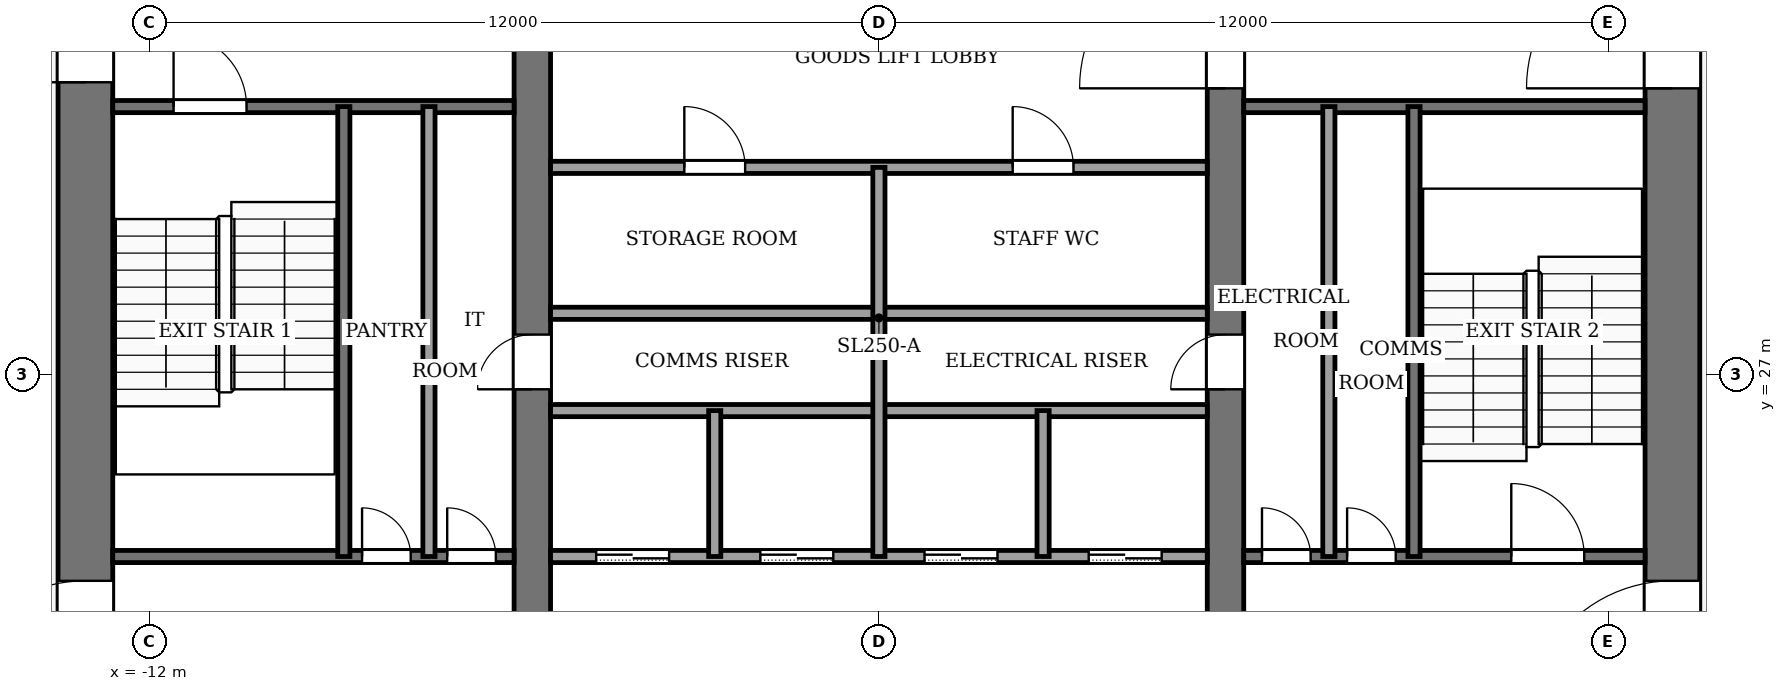
"""IFC4 building model, lengths in metres.
Left out: names, types, materials, properties, quantities, classifications, styles, units other than length and angle.
Written with IfcOpenShell. Run it as: python <this file> out.ifc"""

import sys

from ifc_helpers import new_model, si_unit, direction, frame, frame_2d, origin, place, context, subcontext, project, spatial, rectangle, extrude, element, fill, save


model = new_model("IFC4")
c1 = context("Model", 3, precision=1e-05, world=origin(), true_north=direction((0.0, 1.0)))
c2 = subcontext(c1, "Body", "Model", "MODEL_VIEW")
j1 = project(units=[si_unit("LENGTHUNIT", "METRE"), si_unit("PLANEANGLEUNIT", "RADIAN")], contexts=[c1])
p1 = place(None, origin())
s1 = spatial("IfcSite", under=j1, at=p1, CompositionType="ELEMENT")
p2 = place(p1, origin())
s2 = spatial("IfcBuilding", under=s1, at=p2, CompositionType="ELEMENT")
p3 = place(p2, frame((0.0, 0.0, 222.0)))
s3 = spatial("IfcBuildingStorey", under=s2, at=p3, CompositionType="ELEMENT", Elevation=222.0)
p4 = place(p3, frame((-13.05, 18.4, -0.13), z_axis=(0.0, 0.0, 1.0), x_axis=(0.0, 1.0, 0.0)))
e1 = element("IfcWall", 1, at=p4, inside=s3, PredefinedType="SHEAR", context=c2, shape_type="SweptSolid", body=[
    extrude(rectangle(XDim=19.2, YDim=0.9, at=frame_2d((9.6, 0.0))), origin(), (0.0, 0.0, 1.0), 3.88),
])
p5 = place(p4, frame((2.8, 0.0, 0.13)))
e2 = element("IfcOpeningElement", 2, at=p5, cuts=e1, PredefinedType="OPENING", context=c2, shape_type="SweptSolid", body=[
    extrude(rectangle(XDim=2.4, YDim=2.4, at=frame_2d((1.2, 1.2))), frame((0.0, 0.46, 0.0), z_axis=(0.0, -1.0, 0.0), x_axis=(1.0, 0.0, 0.0)), (0.0, 0.0, 1.0), 0.92),
])
p6 = place(p4, frame((13.4, 0.0, 0.13)))
e3 = element("IfcOpeningElement", 3, at=p6, cuts=e1, PredefinedType="OPENING", context=c2, shape_type="SweptSolid", body=[
    extrude(rectangle(XDim=1.4, YDim=2.2, at=frame_2d((0.7, 1.1))), frame((0.0, 0.46, 0.0), z_axis=(0.0, -1.0, 0.0), x_axis=(1.0, 0.0, 0.0)), (0.0, 0.0, 1.0), 0.92),
])
p7 = place(p3, frame((13.05, 18.4, -0.13), z_axis=(0.0, 0.0, 1.0), x_axis=(0.0, 1.0, 0.0)))
e4 = element("IfcWall", 4, at=p7, inside=s3, PredefinedType="SHEAR", context=c2, shape_type="SweptSolid", body=[
    extrude(rectangle(XDim=19.2, YDim=0.9, at=frame_2d((9.6, 0.0))), origin(), (0.0, 0.0, 1.0), 3.88),
])
p8 = place(p7, frame((2.8, 0.0, 0.13)))
e5 = element("IfcOpeningElement", 5, at=p8, cuts=e4, PredefinedType="OPENING", context=c2, shape_type="SweptSolid", body=[
    extrude(rectangle(XDim=2.4, YDim=2.4, at=frame_2d((1.2, 1.2))), frame((0.0, 0.46, 0.0), z_axis=(0.0, -1.0, 0.0), x_axis=(1.0, 0.0, 0.0)), (0.0, 0.0, 1.0), 0.92),
])
p9 = place(p7, frame((13.3, 0.0, 0.13)))
e6 = element("IfcOpeningElement", 6, at=p9, cuts=e4, PredefinedType="OPENING", context=c2, shape_type="SweptSolid", body=[
    extrude(rectangle(XDim=2.4, YDim=2.4, at=frame_2d((1.2, 1.2))), frame((0.0, 0.46, 0.0), z_axis=(0.0, -1.0, 0.0), x_axis=(1.0, 0.0, 0.0)), (0.0, 0.0, 1.0), 0.92),
])
p10 = place(p3, frame((-5.7, 18.4, -0.13), z_axis=(0.0, 0.0, 1.0), x_axis=(0.0, 1.0, 0.0)))
e7 = element("IfcWall", 7, at=p10, inside=s3, PredefinedType="SHEAR", context=c2, shape_type="SweptSolid", body=[
    extrude(rectangle(XDim=19.2, YDim=0.6, at=frame_2d((9.6, 0.0))), origin(), (0.0, 0.0, 1.0), 3.88),
])
p11 = place(p10, frame((8.35, 0.0, 0.13)))
e8 = element("IfcOpeningElement", 8, at=p11, cuts=e7, PredefinedType="OPENING", context=c2, shape_type="SweptSolid", body=[
    extrude(rectangle(XDim=0.9, YDim=2.1, at=frame_2d((0.45, 1.05))), frame((0.0, 0.31, 0.0), z_axis=(0.0, -1.0, 0.0), x_axis=(1.0, 0.0, 0.0)), (0.0, 0.0, 1.0), 0.62),
])
p12 = place(p3, frame((5.7, 18.4, -0.13), z_axis=(0.0, 0.0, 1.0), x_axis=(0.0, 1.0, 0.0)))
e9 = element("IfcWall", 9, at=p12, inside=s3, PredefinedType="SHEAR", context=c2, shape_type="SweptSolid", body=[
    extrude(rectangle(XDim=19.2, YDim=0.6, at=frame_2d((9.6, 0.0))), origin(), (0.0, 0.0, 1.0), 3.88),
])
p13 = place(p12, frame((8.35, 0.0, 0.13)))
e10 = element("IfcOpeningElement", 10, at=p13, cuts=e9, PredefinedType="OPENING", context=c2, shape_type="SweptSolid", body=[
    extrude(rectangle(XDim=0.9, YDim=2.1, at=frame_2d((0.45, 1.05))), frame((0.0, 0.31, 0.0), z_axis=(0.0, -1.0, 0.0), x_axis=(1.0, 0.0, 0.0)), (0.0, 0.0, 1.0), 0.62),
])
p14 = place(p12, frame((13.3, 0.0, 0.13)))
e11 = element("IfcOpeningElement", 11, at=p14, cuts=e9, PredefinedType="OPENING", context=c2, shape_type="SweptSolid", body=[
    extrude(rectangle(XDim=2.4, YDim=2.4, at=frame_2d((1.2, 1.2))), frame((0.0, 0.31, 0.0), z_axis=(0.0, -1.0, 0.0), x_axis=(1.0, 0.0, 0.0)), (0.0, 0.0, 1.0), 0.62),
])
p15 = place(p3, frame((-12.6, 24.0, 0.0), z_axis=(0.0, 0.0, 1.0), x_axis=(1.0, 0.0, 0.0)))
e12 = element("IfcWall", 12, at=p15, inside=s3, PredefinedType="PARTITIONING", context=c2, shape_type="SweptSolid", body=[
    extrude(rectangle(XDim=6.6, YDim=0.2, at=frame_2d((3.3, 0.0))), origin(), (0.0, 0.0, 1.0), 3.75),
])
p16 = place(p15, frame((4.1, 0.0, 0.0)))
e13 = element("IfcOpeningElement", 13, at=p16, cuts=e12, PredefinedType="OPENING", context=c2, shape_type="SweptSolid", body=[
    extrude(rectangle(XDim=0.8, YDim=2.1, at=frame_2d((0.4, 1.05))), frame((0.0, 0.11, 0.0), z_axis=(0.0, -1.0, 0.0), x_axis=(1.0, 0.0, 0.0)), (0.0, 0.0, 1.0), 0.22),
])
p17 = place(p15, frame((5.5, 0.0, 0.0)))
e14 = element("IfcOpeningElement", 14, at=p17, cuts=e12, PredefinedType="OPENING", context=c2, shape_type="SweptSolid", body=[
    extrude(rectangle(XDim=0.8, YDim=2.1, at=frame_2d((0.4, 1.05))), frame((0.0, 0.11, 0.0), z_axis=(0.0, -1.0, 0.0), x_axis=(1.0, 0.0, 0.0)), (0.0, 0.0, 1.0), 0.22),
])
p18 = place(p3, frame((-5.4, 24.0, 0.0), z_axis=(0.0, 0.0, 1.0), x_axis=(1.0, 0.0, 0.0)))
e15 = element("IfcWall", 15, at=p18, inside=s3, PredefinedType="PARTITIONING", context=c2, shape_type="SweptSolid", body=[
    extrude(rectangle(XDim=10.8, YDim=0.2, at=frame_2d((5.4, 0.0))), origin(), (0.0, 0.0, 1.0), 3.75),
])
p19 = place(p18, frame((0.75, 0.0, 0.0)))
e16 = element("IfcOpeningElement", 16, at=p19, cuts=e15, PredefinedType="OPENING", context=c2, shape_type="SweptSolid", body=[
    extrude(rectangle(XDim=1.2, YDim=2.2, at=frame_2d((0.6, 1.1))), frame((0.0, 0.11, 0.0), z_axis=(0.0, -1.0, 0.0), x_axis=(1.0, 0.0, 0.0)), (0.0, 0.0, 1.0), 0.22),
])
p20 = place(p18, frame((3.45, 0.0, 0.0)))
e17 = element("IfcOpeningElement", 17, at=p20, cuts=e15, PredefinedType="OPENING", context=c2, shape_type="SweptSolid", body=[
    extrude(rectangle(XDim=1.2, YDim=2.2, at=frame_2d((0.6, 1.1))), frame((0.0, 0.11, 0.0), z_axis=(0.0, -1.0, 0.0), x_axis=(1.0, 0.0, 0.0)), (0.0, 0.0, 1.0), 0.22),
])
p21 = place(p18, frame((6.15, 0.0, 0.0)))
e18 = element("IfcOpeningElement", 18, at=p21, cuts=e15, PredefinedType="OPENING", context=c2, shape_type="SweptSolid", body=[
    extrude(rectangle(XDim=1.2, YDim=2.2, at=frame_2d((0.6, 1.1))), frame((0.0, 0.11, 0.0), z_axis=(0.0, -1.0, 0.0), x_axis=(1.0, 0.0, 0.0)), (0.0, 0.0, 1.0), 0.22),
])
p22 = place(p18, frame((8.85, 0.0, 0.0)))
e19 = element("IfcOpeningElement", 19, at=p22, cuts=e15, PredefinedType="OPENING", context=c2, shape_type="SweptSolid", body=[
    extrude(rectangle(XDim=1.2, YDim=2.2, at=frame_2d((0.6, 1.1))), frame((0.0, 0.11, 0.0), z_axis=(0.0, -1.0, 0.0), x_axis=(1.0, 0.0, 0.0)), (0.0, 0.0, 1.0), 0.22),
])
p23 = place(p3, frame((6.0, 24.0, 0.0), z_axis=(0.0, 0.0, 1.0), x_axis=(1.0, 0.0, 0.0)))
e20 = element("IfcWall", 20, at=p23, inside=s3, PredefinedType="PARTITIONING", context=c2, shape_type="SweptSolid", body=[
    extrude(rectangle(XDim=6.6, YDim=0.2, at=frame_2d((3.3, 0.0))), origin(), (0.0, 0.0, 1.0), 3.75),
])
p24 = place(p23, frame((0.3, 0.0, 0.0)))
e21 = element("IfcOpeningElement", 21, at=p24, cuts=e20, PredefinedType="OPENING", context=c2, shape_type="SweptSolid", body=[
    extrude(rectangle(XDim=0.8, YDim=2.1, at=frame_2d((0.4, 1.05))), frame((0.0, 0.11, 0.0), z_axis=(0.0, -1.0, 0.0), x_axis=(1.0, 0.0, 0.0)), (0.0, 0.0, 1.0), 0.22),
])
p25 = place(p23, frame((1.7, 0.0, 0.0)))
e22 = element("IfcOpeningElement", 22, at=p25, cuts=e20, PredefinedType="OPENING", context=c2, shape_type="SweptSolid", body=[
    extrude(rectangle(XDim=0.8, YDim=2.1, at=frame_2d((0.4, 1.05))), frame((0.0, 0.11, 0.0), z_axis=(0.0, -1.0, 0.0), x_axis=(1.0, 0.0, 0.0)), (0.0, 0.0, 1.0), 0.22),
])
p26 = place(p23, frame((4.4, 0.0, 0.0)))
e23 = element("IfcOpeningElement", 23, at=p26, cuts=e20, PredefinedType="OPENING", context=c2, shape_type="SweptSolid", body=[
    extrude(rectangle(XDim=1.2, YDim=2.2, at=frame_2d((0.6, 1.1))), frame((0.0, 0.11, 0.0), z_axis=(0.0, -1.0, 0.0), x_axis=(1.0, 0.0, 0.0)), (0.0, 0.0, 1.0), 0.22),
])
for number, where, z_axis, x_axis in (
    (24, (-5.4, 26.4, 0.0), (0.0, 0.0, 1.0), (1.0, 0.0, 0.0)),
    (25, (-5.4, 28.0, 0.0), (0.0, 0.0, 1.0), (1.0, 0.0, 0.0)),
):
    element("IfcWall", number, at=place(p3, frame(where, z_axis=z_axis, x_axis=x_axis)), inside=s3, PredefinedType="PARTITIONING", context=c2, shape_type="SweptSolid", body=[
        extrude(rectangle(XDim=10.8, YDim=0.2, at=frame_2d((5.4, 0.0))), origin(), (0.0, 0.0, 1.0), 3.75),
    ])
p27 = place(p3, frame((-5.4, 30.4, 0.0), z_axis=(0.0, 0.0, 1.0), x_axis=(1.0, 0.0, 0.0)))
e26 = element("IfcWall", 26, at=p27, inside=s3, PredefinedType="PARTITIONING", context=c2, shape_type="SweptSolid", body=[
    extrude(rectangle(XDim=10.8, YDim=0.2, at=frame_2d((5.4, 0.0))), origin(), (0.0, 0.0, 1.0), 3.75),
])
p28 = place(p27, frame((2.2, 0.0, 0.0)))
e27 = element("IfcOpeningElement", 27, at=p28, cuts=e26, PredefinedType="OPENING", context=c2, shape_type="SweptSolid", body=[
    extrude(rectangle(XDim=1.0, YDim=2.1, at=frame_2d((0.5, 1.05))), frame((0.0, 0.11, 0.0), z_axis=(0.0, -1.0, 0.0), x_axis=(1.0, 0.0, 0.0)), (0.0, 0.0, 1.0), 0.22),
])
p29 = place(p27, frame((7.6, 0.0, 0.0)))
e28 = element("IfcOpeningElement", 28, at=p29, cuts=e26, PredefinedType="OPENING", context=c2, shape_type="SweptSolid", body=[
    extrude(rectangle(XDim=1.0, YDim=2.1, at=frame_2d((0.5, 1.05))), frame((0.0, 0.11, 0.0), z_axis=(0.0, -1.0, 0.0), x_axis=(1.0, 0.0, 0.0)), (0.0, 0.0, 1.0), 0.22),
])
p30 = place(p3, frame((-12.6, 31.4, 0.0), z_axis=(0.0, 0.0, 1.0), x_axis=(1.0, 0.0, 0.0)))
e29 = element("IfcWall", 29, at=p30, inside=s3, PredefinedType="PARTITIONING", context=c2, shape_type="SweptSolid", body=[
    extrude(rectangle(XDim=6.6, YDim=0.2, at=frame_2d((3.3, 0.0))), origin(), (0.0, 0.0, 1.0), 3.75),
])
p31 = place(p30, frame((1.0, 0.0, 0.0)))
e30 = element("IfcOpeningElement", 30, at=p31, cuts=e29, PredefinedType="OPENING", context=c2, shape_type="SweptSolid", body=[
    extrude(rectangle(XDim=1.2, YDim=2.2, at=frame_2d((0.6, 1.1))), frame((0.0, 0.11, 0.0), z_axis=(0.0, -1.0, 0.0), x_axis=(1.0, 0.0, 0.0)), (0.0, 0.0, 1.0), 0.22),
])
p32 = place(p3, frame((6.0, 31.4, 0.0), z_axis=(0.0, 0.0, 1.0), x_axis=(1.0, 0.0, 0.0)))
e31 = element("IfcWall", 31, at=p32, inside=s3, PredefinedType="PARTITIONING", context=c2, shape_type="SweptSolid", body=[
    extrude(rectangle(XDim=6.6, YDim=0.2, at=frame_2d((3.3, 0.0))), origin(), (0.0, 0.0, 1.0), 3.75),
])
for number, where, z_axis, x_axis in (
    (32, (-8.8, 24.0, 0.0), (0.0, 0.0, 1.0), (0.0, 1.0, 0.0)),
    (33, (-7.4, 24.0, 0.0), (0.0, 0.0, 1.0), (0.0, 1.0, 0.0)),
):
    element("IfcWall", number, at=place(p3, frame(where, z_axis=z_axis, x_axis=x_axis)), inside=s3, PredefinedType="PARTITIONING", context=c2, shape_type="SweptSolid", body=[
        extrude(rectangle(XDim=7.4, YDim=0.2, at=frame_2d((3.7, 0.0))), origin(), (0.0, 0.0, 1.0), 3.75),
    ])
p33 = place(p3, frame((-2.7, 24.0, 0.0), z_axis=(0.0, 0.0, 1.0), x_axis=(0.0, 1.0, 0.0)))
e34 = element("IfcWall", 34, at=p33, inside=s3, PredefinedType="PARTITIONING", context=c2, shape_type="SweptSolid", body=[
    extrude(rectangle(XDim=2.4, YDim=0.2, at=frame_2d((1.2, 0.0))), origin(), (0.0, 0.0, 1.0), 3.75),
])
p34 = place(p3, frame((0.0, 24.0, 0.0), z_axis=(0.0, 0.0, 1.0), x_axis=(0.0, 1.0, 0.0)))
e35 = element("IfcWall", 35, at=p34, inside=s3, PredefinedType="PARTITIONING", context=c2, shape_type="SweptSolid", body=[
    extrude(rectangle(XDim=6.4, YDim=0.2, at=frame_2d((3.2, 0.0))), origin(), (0.0, 0.0, 1.0), 3.75),
])
p35 = place(p3, frame((2.7, 24.0, 0.0), z_axis=(0.0, 0.0, 1.0), x_axis=(0.0, 1.0, 0.0)))
e36 = element("IfcWall", 36, at=p35, inside=s3, PredefinedType="PARTITIONING", context=c2, shape_type="SweptSolid", body=[
    extrude(rectangle(XDim=2.4, YDim=0.2, at=frame_2d((1.2, 0.0))), origin(), (0.0, 0.0, 1.0), 3.75),
])
for number, where, z_axis, x_axis in (
    (37, (7.4, 24.0, 0.0), (0.0, 0.0, 1.0), (0.0, 1.0, 0.0)),
    (38, (8.8, 24.0, 0.0), (0.0, 0.0, 1.0), (0.0, 1.0, 0.0)),
):
    element("IfcWall", number, at=place(p3, frame(where, z_axis=z_axis, x_axis=x_axis)), inside=s3, PredefinedType="PARTITIONING", context=c2, shape_type="SweptSolid", body=[
        extrude(rectangle(XDim=7.4, YDim=0.2, at=frame_2d((3.7, 0.0))), origin(), (0.0, 0.0, 1.0), 3.75),
    ])
p36 = place(p19, origin())
e39 = element("IfcDoor", 39, at=p36, inside=s3, OperationType="SLIDING_TO_LEFT", PredefinedType="DOOR", context=c2, shape_type="SweptSolid", body=[
    extrude(rectangle(XDim=1.2, YDim=2.2, at=frame_2d((0.6, 1.1))), frame((0.0, 0.025, 0.0), z_axis=(0.0, -1.0, 0.0), x_axis=(1.0, 0.0, 0.0)), (0.0, 0.0, 1.0), 0.05),
])
fill(e16, e39)
p37 = place(p20, origin())
e40 = element("IfcDoor", 40, at=p37, inside=s3, OperationType="SLIDING_TO_LEFT", PredefinedType="DOOR", context=c2, shape_type="SweptSolid", body=[
    extrude(rectangle(XDim=1.2, YDim=2.2, at=frame_2d((0.6, 1.1))), frame((0.0, 0.025, 0.0), z_axis=(0.0, -1.0, 0.0), x_axis=(1.0, 0.0, 0.0)), (0.0, 0.0, 1.0), 0.05),
])
fill(e17, e40)
p38 = place(p21, origin())
e41 = element("IfcDoor", 41, at=p38, inside=s3, OperationType="SLIDING_TO_LEFT", PredefinedType="DOOR", context=c2, shape_type="SweptSolid", body=[
    extrude(rectangle(XDim=1.2, YDim=2.2, at=frame_2d((0.6, 1.1))), frame((0.0, 0.025, 0.0), z_axis=(0.0, -1.0, 0.0), x_axis=(1.0, 0.0, 0.0)), (0.0, 0.0, 1.0), 0.05),
])
fill(e18, e41)
p39 = place(p22, origin())
e42 = element("IfcDoor", 42, at=p39, inside=s3, OperationType="SLIDING_TO_LEFT", PredefinedType="DOOR", context=c2, shape_type="SweptSolid", body=[
    extrude(rectangle(XDim=1.2, YDim=2.2, at=frame_2d((0.6, 1.1))), frame((0.0, 0.025, 0.0), z_axis=(0.0, -1.0, 0.0), x_axis=(1.0, 0.0, 0.0)), (0.0, 0.0, 1.0), 0.05),
])
fill(e19, e42)
p40 = place(p28, origin())
e43 = element("IfcDoor", 43, at=p40, inside=s3, OperationType="SINGLE_SWING_LEFT", PredefinedType="DOOR", context=c2, shape_type="SweptSolid", body=[
    extrude(rectangle(XDim=1.0, YDim=2.1, at=frame_2d((0.5, 1.05))), frame((0.0, 0.025, 0.0), z_axis=(0.0, -1.0, 0.0), x_axis=(1.0, 0.0, 0.0)), (0.0, 0.0, 1.0), 0.05),
])
fill(e27, e43)
p41 = place(p29, origin())
e44 = element("IfcDoor", 44, at=p41, inside=s3, OperationType="SINGLE_SWING_RIGHT", PredefinedType="DOOR", context=c2, shape_type="SweptSolid", body=[
    extrude(rectangle(XDim=1.0, YDim=2.1, at=frame_2d((0.5, 1.05))), frame((0.0, 0.025, 0.0), z_axis=(0.0, -1.0, 0.0), x_axis=(1.0, 0.0, 0.0)), (0.0, 0.0, 1.0), 0.05),
])
fill(e28, e44)
p42 = place(p16, origin())
e45 = element("IfcDoor", 45, at=p42, inside=s3, OperationType="SINGLE_SWING_RIGHT", PredefinedType="DOOR", context=c2, shape_type="SweptSolid", body=[
    extrude(rectangle(XDim=0.8, YDim=2.1, at=frame_2d((0.4, 1.05))), frame((0.0, 0.025, 0.0), z_axis=(0.0, -1.0, 0.0), x_axis=(1.0, 0.0, 0.0)), (0.0, 0.0, 1.0), 0.05),
])
fill(e13, e45)
p43 = place(p17, origin())
e46 = element("IfcDoor", 46, at=p43, inside=s3, OperationType="SINGLE_SWING_LEFT", PredefinedType="DOOR", context=c2, shape_type="SweptSolid", body=[
    extrude(rectangle(XDim=0.8, YDim=2.1, at=frame_2d((0.4, 1.05))), frame((0.0, 0.025, 0.0), z_axis=(0.0, -1.0, 0.0), x_axis=(1.0, 0.0, 0.0)), (0.0, 0.0, 1.0), 0.05),
])
fill(e14, e46)
p44 = place(p24, origin())
e47 = element("IfcDoor", 47, at=p44, inside=s3, OperationType="SINGLE_SWING_RIGHT", PredefinedType="DOOR", context=c2, shape_type="SweptSolid", body=[
    extrude(rectangle(XDim=0.8, YDim=2.1, at=frame_2d((0.4, 1.05))), frame((0.0, 0.025, 0.0), z_axis=(0.0, -1.0, 0.0), x_axis=(1.0, 0.0, 0.0)), (0.0, 0.0, 1.0), 0.05),
])
fill(e21, e47)
p45 = place(p25, origin())
e48 = element("IfcDoor", 48, at=p45, inside=s3, OperationType="SINGLE_SWING_LEFT", PredefinedType="DOOR", context=c2, shape_type="SweptSolid", body=[
    extrude(rectangle(XDim=0.8, YDim=2.1, at=frame_2d((0.4, 1.05))), frame((0.0, 0.025, 0.0), z_axis=(0.0, -1.0, 0.0), x_axis=(1.0, 0.0, 0.0)), (0.0, 0.0, 1.0), 0.05),
])
fill(e22, e48)
p46 = place(p11, origin())
e49 = element("IfcDoor", 49, at=p46, inside=s3, OperationType="SINGLE_SWING_LEFT", PredefinedType="DOOR", context=c2, shape_type="SweptSolid", body=[
    extrude(rectangle(XDim=0.9, YDim=2.1, at=frame_2d((0.45, 1.05))), frame((0.0, 0.025, 0.0), z_axis=(0.0, -1.0, 0.0), x_axis=(1.0, 0.0, 0.0)), (0.0, 0.0, 1.0), 0.05),
])
fill(e8, e49)
p47 = place(p13, origin())
e50 = element("IfcDoor", 50, at=p47, inside=s3, OperationType="SINGLE_SWING_RIGHT", PredefinedType="DOOR", context=c2, shape_type="SweptSolid", body=[
    extrude(rectangle(XDim=0.9, YDim=2.1, at=frame_2d((0.45, 1.05))), frame((0.0, 0.025, 0.0), z_axis=(0.0, -1.0, 0.0), x_axis=(1.0, 0.0, 0.0)), (0.0, 0.0, 1.0), 0.05),
])
fill(e10, e50)
p48 = place(p31, origin())
e51 = element("IfcDoor", 51, at=p48, inside=s3, OperationType="SINGLE_SWING_RIGHT", PredefinedType="DOOR", context=c2, shape_type="SweptSolid", body=[
    extrude(rectangle(XDim=1.2, YDim=2.2, at=frame_2d((0.6, 1.1))), frame((0.0, 0.025, 0.0), z_axis=(0.0, -1.0, 0.0), x_axis=(1.0, 0.0, 0.0)), (0.0, 0.0, 1.0), 0.05),
])
fill(e30, e51)
p49 = place(p26, origin())
e52 = element("IfcDoor", 52, at=p49, inside=s3, OperationType="SINGLE_SWING_LEFT", PredefinedType="DOOR", context=c2, shape_type="SweptSolid", body=[
    extrude(rectangle(XDim=1.2, YDim=2.2, at=frame_2d((0.6, 1.1))), frame((0.0, 0.025, 0.0), z_axis=(0.0, -1.0, 0.0), x_axis=(1.0, 0.0, 0.0)), (0.0, 0.0, 1.0), 0.05),
])
fill(e23, e52)
p50 = place(p14, origin())
e53 = element("IfcDoor", 53, at=p50, inside=s3, OperationType="DOUBLE_DOOR_SINGLE_SWING", PredefinedType="DOOR", context=c2, shape_type="SweptSolid", body=[
    extrude(rectangle(XDim=2.4, YDim=2.4, at=frame_2d((1.2, 1.2))), frame((0.0, 0.025, 0.0), z_axis=(0.0, -1.0, 0.0), x_axis=(1.0, 0.0, 0.0)), (0.0, 0.0, 1.0), 0.05),
])
fill(e11, e53)
p51 = place(p5, origin())
e54 = element("IfcDoor", 54, at=p51, inside=s3, OperationType="DOUBLE_DOOR_SINGLE_SWING", PredefinedType="DOOR", context=c2, shape_type="SweptSolid", body=[
    extrude(rectangle(XDim=2.4, YDim=2.4, at=frame_2d((1.2, 1.2))), frame((0.0, 0.025, 0.0), z_axis=(0.0, -1.0, 0.0), x_axis=(1.0, 0.0, 0.0)), (0.0, 0.0, 1.0), 0.05),
])
fill(e2, e54)
p52 = place(p8, origin())
e55 = element("IfcDoor", 55, at=p52, inside=s3, OperationType="DOUBLE_DOOR_SINGLE_SWING", PredefinedType="DOOR", context=c2, shape_type="SweptSolid", body=[
    extrude(rectangle(XDim=2.4, YDim=2.4, at=frame_2d((1.2, 1.2))), frame((0.0, 0.025, 0.0), z_axis=(0.0, -1.0, 0.0), x_axis=(1.0, 0.0, 0.0)), (0.0, 0.0, 1.0), 0.05),
])
fill(e5, e55)
p53 = place(p9, origin())
e56 = element("IfcDoor", 56, at=p53, inside=s3, OperationType="DOUBLE_DOOR_SINGLE_SWING", PredefinedType="DOOR", context=c2, shape_type="SweptSolid", body=[
    extrude(rectangle(XDim=2.4, YDim=2.4, at=frame_2d((1.2, 1.2))), frame((0.0, 0.025, 0.0), z_axis=(0.0, -1.0, 0.0), x_axis=(1.0, 0.0, 0.0)), (0.0, 0.0, 1.0), 0.05),
])
fill(e6, e56)
p54 = place(p6, origin())
e57 = element("IfcDoor", 57, at=p54, inside=s3, OperationType="SINGLE_SWING_RIGHT", PredefinedType="DOOR", context=c2, shape_type="SweptSolid", body=[
    extrude(rectangle(XDim=1.4, YDim=2.2, at=frame_2d((0.7, 1.1))), frame((0.0, 0.025, 0.0), z_axis=(0.0, -1.0, 0.0), x_axis=(1.0, 0.0, 0.0)), (0.0, 0.0, 1.0), 0.05),
])
fill(e3, e57)
save(model, sys.argv[1])
